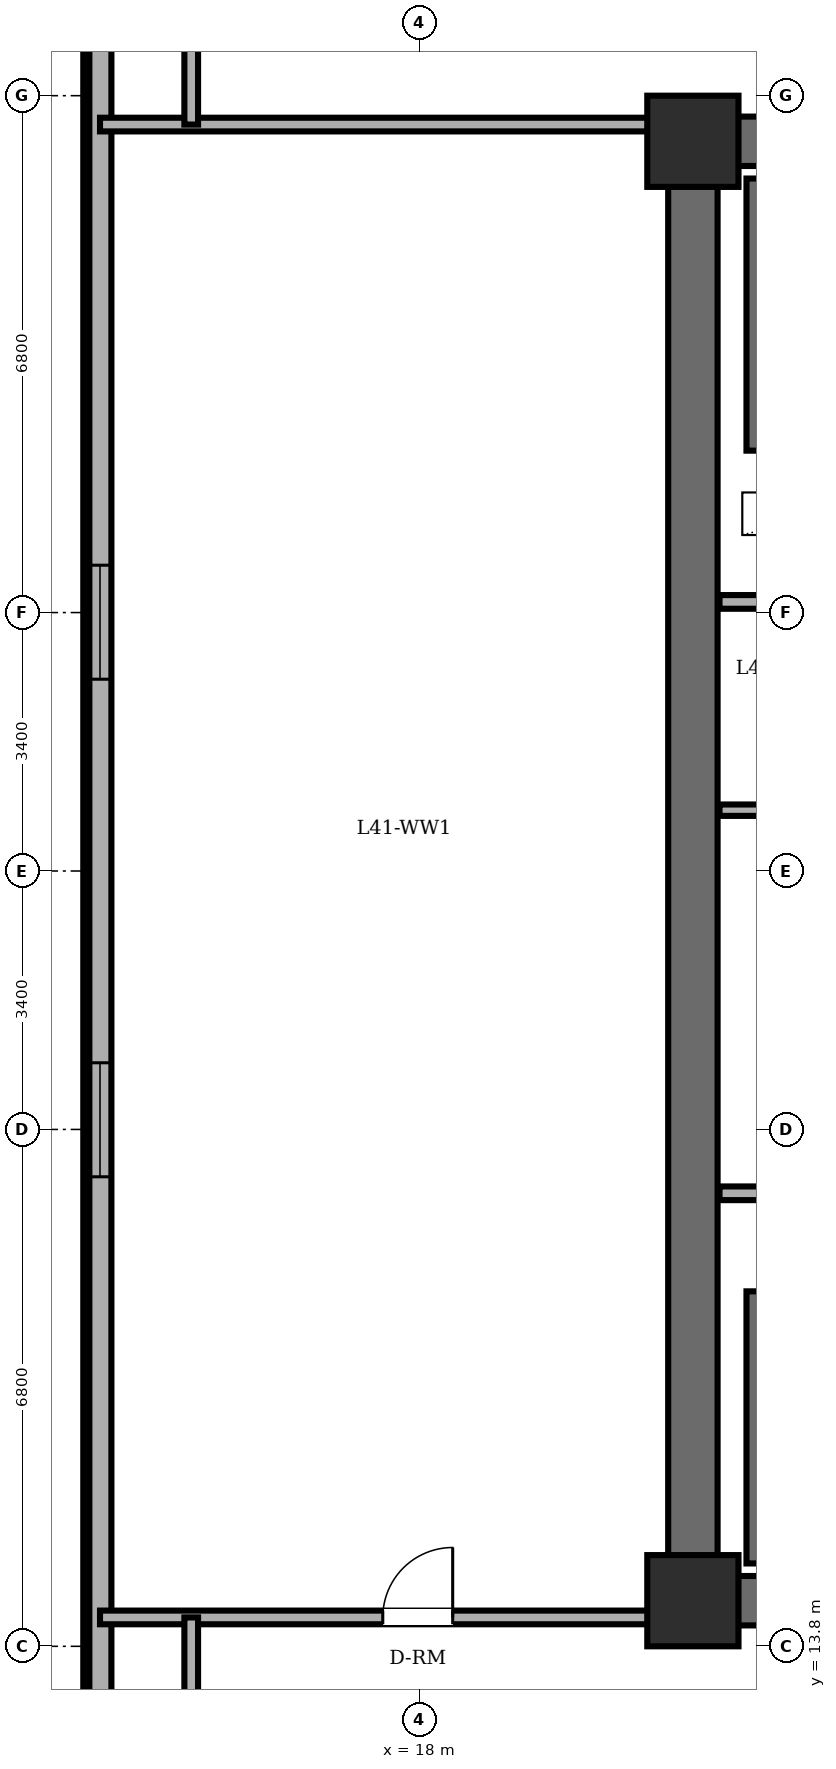
"""IFC4 building model, lengths in metres.
Left out: names, types, materials, properties, quantities, classifications, styles, units other than length and angle.
Written with IfcOpenShell. Run it as: python <this file> out.ifc"""

import sys

from ifc_helpers import new_model, si_unit, direction, frame, frame_2d, origin, origin_2d, place, context, subcontext, project, spatial, rectangle, extrude, element, fill, save


model = new_model("IFC4")
c1 = context("Model", 3, precision=1e-05, world=origin(), true_north=direction((0.0, 1.0)))
c2 = subcontext(c1, "Body", "Model", "MODEL_VIEW")
j1 = project(units=[si_unit("LENGTHUNIT", "METRE"), si_unit("PLANEANGLEUNIT", "RADIAN")], contexts=[c1])
p1 = place(None, origin())
s1 = spatial("IfcSite", under=j1, at=p1, CompositionType="ELEMENT")
p2 = place(p1, origin())
s2 = spatial("IfcBuilding", under=s1, at=p2, CompositionType="ELEMENT")
p3 = place(p2, frame((0.0, 0.0, 158.2)))
s3 = spatial("IfcBuildingStorey", under=s2, at=p3, CompositionType="ELEMENT", Elevation=158.2)
for number, where, z_axis, x_axis in (
    (1, (21.6, 14.4, 0.0), (0.0, 0.0, 1.0), (1.0, 0.0, 0.0)),
    (2, (21.6, 33.6, 0.0), (0.0, 0.0, 1.0), (1.0, 0.0, 0.0)),
):
    element("IfcColumn", number, at=place(p3, frame(where, z_axis=z_axis, x_axis=x_axis)), inside=s3, PredefinedType="COLUMN", context=c2, shape_type="SweptSolid", body=[
        extrude(rectangle(XDim=1.2, YDim=1.2, at=origin_2d()), origin(), (0.0, 0.0, 1.0), 3.6),
    ])
p4 = place(p3, frame((13.8, 36.3, 0.0), z_axis=(0.0, 0.0, 1.0), x_axis=(0.0, -1.0, 0.0)))
e3 = element("IfcWall", 3, at=p4, inside=s3, PredefinedType="SOLIDWALL", context=c2, shape_type="SweptSolid", body=[
    extrude(rectangle(XDim=24.6, YDim=0.3, at=frame_2d((12.3, 0.0))), origin(), (0.0, 0.0, 1.0), 3.4),
])
p5 = place(p4, frame((8.277, 0.0, 0.85)))
e4 = element("IfcOpeningElement", 4, at=p5, cuts=e3, PredefinedType="OPENING", context=c2, shape_type="SweptSolid", body=[
    extrude(rectangle(XDim=1.5, YDim=1.55, at=frame_2d((0.75, 0.775))), frame((0.0, 0.16, 0.0), z_axis=(0.0, -1.0, 0.0), x_axis=(1.0, 0.0, 0.0)), (0.0, 0.0, 1.0), 0.32),
])
p6 = place(p4, frame((14.823, 0.0, 0.85)))
e5 = element("IfcOpeningElement", 5, at=p6, cuts=e3, PredefinedType="OPENING", context=c2, shape_type="SweptSolid", body=[
    extrude(rectangle(XDim=1.5, YDim=1.55, at=frame_2d((0.75, 0.775))), frame((0.0, 0.16, 0.0), z_axis=(0.0, -1.0, 0.0), x_axis=(1.0, 0.0, 0.0)), (0.0, 0.0, 1.0), 0.32),
])
p7 = place(p3, frame((21.6, 14.4, 0.0), z_axis=(0.0, 0.0, 1.0), x_axis=(0.0, 1.0, 0.0)))
e6 = element("IfcWall", 6, at=p7, inside=s3, PredefinedType="SHEAR", context=c2, shape_type="SweptSolid", body=[
    extrude(rectangle(XDim=19.2, YDim=0.65, at=frame_2d((9.6, 0.0))), origin(), (0.0, 0.0, 1.0), 3.4),
])
for number, where, z_axis, x_axis in (
    (7, (21.6, 33.6, 0.0), (0.0, 0.0, 1.0), (1.0, 0.0, 0.0)),
    (8, (37.2, 14.4, 0.0), (0.0, 0.0, 1.0), (-1.0, 0.0, 0.0)),
):
    element("IfcWall", number, at=place(p3, frame(where, z_axis=z_axis, x_axis=x_axis)), inside=s3, PredefinedType="SHEAR", context=c2, shape_type="SweptSolid", body=[
        extrude(rectangle(XDim=15.6, YDim=0.65, at=frame_2d((7.8, 0.0))), origin(), (0.0, 0.0, 1.0), 3.4),
    ])
for number, where, z_axis, x_axis in (
    (9, (22.48, 29.53, 0.0), (0.0, 0.0, 1.0), (0.0, 1.0, 0.0)),
    (10, (22.48, 14.89, 0.0), (0.0, 0.0, 1.0), (0.0, 1.0, 0.0)),
):
    element("IfcWall", number, at=place(p3, frame(where, z_axis=z_axis, x_axis=x_axis)), inside=s3, PredefinedType="SOLIDWALL", context=c2, shape_type="SweptSolid", body=[
        extrude(rectangle(XDim=3.58, YDim=0.35, at=frame_2d((1.79, 0.0))), origin(), (0.0, 0.0, 1.0), 3.4),
    ])
p8 = place(p3, frame((21.95, 27.54, 0.0), z_axis=(0.0, 0.0, 1.0), x_axis=(1.0, 0.0, 0.0)))
e11 = element("IfcWall", 11, at=p8, inside=s3, PredefinedType="PARTITIONING", context=c2, shape_type="SweptSolid", body=[
    extrude(rectangle(XDim=10.56, YDim=0.18, at=frame_2d((5.28, 0.0))), origin(), (0.0, 0.0, 1.0), 3.4),
])
p9 = place(p3, frame((21.95, 19.76, 0.0), z_axis=(0.0, 0.0, 1.0), x_axis=(1.0, 0.0, 0.0)))
e12 = element("IfcWall", 12, at=p9, inside=s3, PredefinedType="PARTITIONING", context=c2, shape_type="SweptSolid", body=[
    extrude(rectangle(XDim=14.87, YDim=0.18, at=frame_2d((7.435, 0.0))), origin(), (0.0, 0.0, 1.0), 3.4),
])
p10 = place(p3, frame((21.95, 24.8, 0.0), z_axis=(0.0, 0.0, 1.0), x_axis=(1.0, 0.0, 0.0)))
e13 = element("IfcWall", 13, at=p10, inside=s3, PredefinedType="PARTITIONING", context=c2, shape_type="SweptSolid", body=[
    extrude(rectangle(XDim=2.51, YDim=0.15, at=frame_2d((1.255, 0.0))), origin(), (0.0, 0.0, 1.0), 3.4),
])
p11 = place(p3, frame((13.8, 14.18, 0.0), z_axis=(0.0, 0.0, 1.0), x_axis=(1.0, 0.0, 0.0)))
e14 = element("IfcWall", 14, at=p11, inside=s3, PredefinedType="PARTITIONING", context=c2, shape_type="SweptSolid", body=[
    extrude(rectangle(XDim=7.68, YDim=0.18, at=frame_2d((3.84, 0.0))), origin(), (0.0, 0.0, 1.0), 3.4),
])
p12 = place(p11, frame((3.72, 0.0, 0.0)))
e15 = element("IfcOpeningElement", 15, at=p12, cuts=e14, PredefinedType="OPENING", context=c2, shape_type="SweptSolid", body=[
    extrude(rectangle(XDim=0.92, YDim=2.1, at=frame_2d((0.46, 1.05))), frame((0.0, 0.1, 0.0), z_axis=(0.0, -1.0, 0.0), x_axis=(1.0, 0.0, 0.0)), (0.0, 0.0, 1.0), 0.2),
])
p13 = place(p3, frame((13.8, 33.82, 0.0), z_axis=(0.0, 0.0, 1.0), x_axis=(1.0, 0.0, 0.0)))
e16 = element("IfcWall", 16, at=p13, inside=s3, PredefinedType="PARTITIONING", context=c2, shape_type="SweptSolid", body=[
    extrude(rectangle(XDim=7.68, YDim=0.18, at=frame_2d((3.84, 0.0))), origin(), (0.0, 0.0, 1.0), 3.4),
])
for number, where, z_axis, x_axis in (
    (17, (15.0, 8.487, 0.0), (0.0, 0.0, 1.0), (0.0, 1.0, 0.0)),
    (18, (15.0, 33.82, 0.0), (0.0, 0.0, 1.0), (0.0, 1.0, 0.0)),
):
    element("IfcWall", number, at=place(p3, frame(where, z_axis=z_axis, x_axis=x_axis)), inside=s3, PredefinedType="PARTITIONING", context=c2, shape_type="SweptSolid", body=[
        extrude(rectangle(XDim=5.693, YDim=0.18, at=frame_2d((2.846, 0.0))), origin(), (0.0, 0.0, 1.0), 3.4),
    ])
p14 = place(p5, origin())
e19 = element("IfcWindow", 19, at=p14, inside=s3, PartitioningType="DOUBLE_PANEL_VERTICAL", PredefinedType="WINDOW", context=c2, shape_type="SweptSolid", body=[
    extrude(rectangle(XDim=1.5, YDim=1.55, at=frame_2d((0.75, 0.775))), frame((0.0, 0.03, 0.0), z_axis=(0.0, -1.0, 0.0), x_axis=(1.0, 0.0, 0.0)), (0.0, 0.0, 1.0), 0.06),
])
fill(e4, e19)
p15 = place(p6, origin())
e20 = element("IfcWindow", 20, at=p15, inside=s3, PartitioningType="DOUBLE_PANEL_VERTICAL", PredefinedType="WINDOW", context=c2, shape_type="SweptSolid", body=[
    extrude(rectangle(XDim=1.5, YDim=1.55, at=frame_2d((0.75, 0.775))), frame((0.0, 0.03, 0.0), z_axis=(0.0, -1.0, 0.0), x_axis=(1.0, 0.0, 0.0)), (0.0, 0.0, 1.0), 0.06),
])
fill(e5, e20)
p16 = place(p12, origin())
e21 = element("IfcDoor", 21, at=p16, inside=s3, OperationType="SINGLE_SWING_RIGHT", PredefinedType="DOOR", context=c2, shape_type="SweptSolid", body=[
    extrude(rectangle(XDim=0.92, YDim=2.1, at=frame_2d((0.46, 1.05))), frame((0.0, 0.025, 0.0), z_axis=(0.0, -1.0, 0.0), x_axis=(1.0, 0.0, 0.0)), (0.0, 0.0, 1.0), 0.05),
])
fill(e15, e21)
save(model, sys.argv[1])
